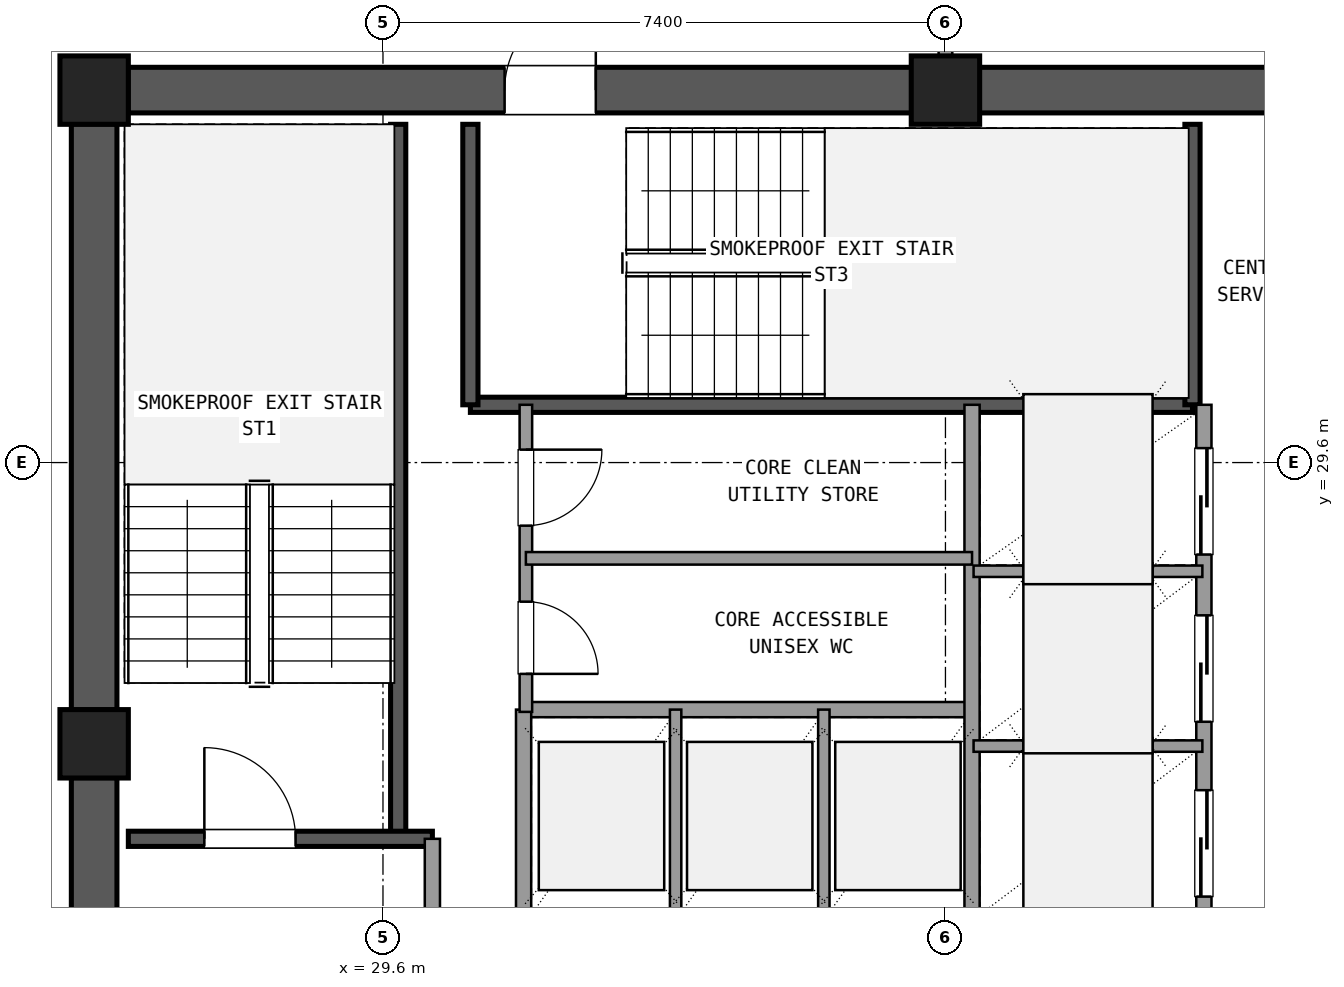
"""IFC4 building model, lengths in metres.
Left out: names, types, materials, properties, quantities, classifications, styles, units other than length and angle.
Written with IfcOpenShell. Run it as: python <this file> out.ifc"""

import sys

from ifc_helpers import new_model, si_unit, direction, frame, frame_2d, origin, origin_2d, place, context, subcontext, project, spatial, rectangle, extrude, element, fill, save


model = new_model("IFC4")
c1 = context("Model", 3, precision=1e-05, world=origin(), true_north=direction((0.0, 1.0)))
c2 = subcontext(c1, "Body", "Model", "MODEL_VIEW")
j1 = project(units=[si_unit("LENGTHUNIT", "METRE"), si_unit("PLANEANGLEUNIT", "RADIAN")], contexts=[c1])
p1 = place(None, origin())
s1 = spatial("IfcSite", under=j1, at=p1, CompositionType="ELEMENT")
p2 = place(p1, origin())
s2 = spatial("IfcBuilding", under=s1, at=p2, CompositionType="ELEMENT")
p3 = place(p2, frame((0.0, 0.0, 199.98)))
s3 = spatial("IfcBuildingStorey", under=s2, at=p3, CompositionType="ELEMENT", Elevation=199.98)
for number, where, z_axis, x_axis in (
    (1, (37.0, 34.5, 0.0), (0.0, 0.0, 1.0), (1.0, 0.0, 0.0)),
    (2, (25.8, 34.5, 0.0), (0.0, 0.0, 1.0), (1.0, 0.0, 0.0)),
    (3, (25.8, 25.9, 0.0), (0.0, 0.0, 1.0), (1.0, 0.0, 0.0)),
):
    element("IfcColumn", number, at=place(p3, frame(where, z_axis=z_axis, x_axis=x_axis)), inside=s3, PredefinedType="COLUMN", context=c2, shape_type="SweptSolid", body=[
        extrude(rectangle(XDim=0.9, YDim=0.9, at=origin_2d()), origin(), (0.0, 0.0, 1.0), 3.6),
    ])
p4 = place(p3, frame((47.755, 34.5, 0.0), z_axis=(0.0, 0.0, 1.0), x_axis=(-1.0, 0.0, 0.0)))
e4 = element("IfcWall", 4, at=p4, inside=s3, PredefinedType="SHEAR", context=c2, shape_type="SweptSolid", body=[
    extrude(rectangle(XDim=10.31, YDim=0.6, at=frame_2d((5.155, 0.0))), origin(), (0.0, 0.0, 1.0), 3.32),
])
p5 = place(p4, frame((4.655, 0.0, 0.0)))
e5 = element("IfcOpeningElement", 5, at=p5, cuts=e4, PredefinedType="OPENING", context=c2, shape_type="SweptSolid", body=[
    extrude(rectangle(XDim=1.6, YDim=2.2, at=frame_2d((0.8, 1.1))), frame((0.0, 0.31, 0.0), z_axis=(0.0, -1.0, 0.0), x_axis=(1.0, 0.0, 0.0)), (0.0, 0.0, 1.0), 0.62),
])
p6 = place(p3, frame((36.555, 34.5, 0.0), z_axis=(0.0, 0.0, 1.0), x_axis=(-1.0, 0.0, 0.0)))
e6 = element("IfcWall", 6, at=p6, inside=s3, PredefinedType="SHEAR", context=c2, shape_type="SweptSolid", body=[
    extrude(rectangle(XDim=10.31, YDim=0.6, at=frame_2d((5.155, 0.0))), origin(), (0.0, 0.0, 1.0), 3.32),
])
p7 = place(p6, frame((4.155, 0.0, 0.0)))
e7 = element("IfcOpeningElement", 7, at=p7, cuts=e6, PredefinedType="OPENING", context=c2, shape_type="SweptSolid", body=[
    extrude(rectangle(XDim=1.2, YDim=2.15, at=frame_2d((0.6, 1.075))), frame((0.0, 0.31, 0.0), z_axis=(0.0, -1.0, 0.0), x_axis=(1.0, 0.0, 0.0)), (0.0, 0.0, 1.0), 0.62),
])
p8 = place(p3, frame((25.8, 34.055, 0.0), z_axis=(0.0, 0.0, 1.0), x_axis=(0.0, -1.0, 0.0)))
e8 = element("IfcWall", 8, at=p8, inside=s3, PredefinedType="SHEAR", context=c2, shape_type="SweptSolid", body=[
    extrude(rectangle(XDim=7.71, YDim=0.6, at=frame_2d((3.855, 0.0))), origin(), (0.0, 0.0, 1.0), 3.32),
])
p9 = place(p3, frame((25.8, 25.455, 0.0), z_axis=(0.0, 0.0, 1.0), x_axis=(0.0, -1.0, 0.0)))
e9 = element("IfcWall", 9, at=p9, inside=s3, PredefinedType="SHEAR", context=c2, shape_type="SweptSolid", body=[
    extrude(rectangle(XDim=7.71, YDim=0.6, at=frame_2d((3.855, 0.0))), origin(), (0.0, 0.0, 1.0), 3.32),
])
p10 = place(p9, frame((2.205, 0.0, 0.0)))
e10 = element("IfcOpeningElement", 10, at=p10, cuts=e9, PredefinedType="OPENING", context=c2, shape_type="SweptSolid", body=[
    extrude(rectangle(XDim=1.2, YDim=2.15, at=frame_2d((0.6, 1.075))), frame((0.0, 0.31, 0.0), z_axis=(0.0, -1.0, 0.0), x_axis=(1.0, 0.0, 0.0)), (0.0, 0.0, 1.0), 0.62),
])
p11 = place(p3, frame((29.8, 24.65, 0.0), z_axis=(0.0, 0.0, 1.0), x_axis=(0.0, 1.0, 0.0)))
e11 = element("IfcWall", 11, at=p11, inside=s3, PredefinedType="SHEAR", context=c2, shape_type="SweptSolid", body=[
    extrude(rectangle(XDim=9.4, YDim=0.2, at=frame_2d((4.7, 0.0))), origin(), (0.0, 0.0, 1.0), 3.32),
])
p12 = place(p3, frame((26.25, 24.65, 0.0), z_axis=(0.0, 0.0, 1.0), x_axis=(1.0, 0.0, 0.0)))
e12 = element("IfcWall", 12, at=p12, inside=s3, PredefinedType="SHEAR", context=c2, shape_type="SweptSolid", body=[
    extrude(rectangle(XDim=4.0, YDim=0.2, at=frame_2d((2.0, 0.0))), origin(), (0.0, 0.0, 1.0), 3.32),
])
p13 = place(p12, frame((1.0, 0.0, 0.0)))
e13 = element("IfcOpeningElement", 13, at=p13, cuts=e12, PredefinedType="OPENING", context=c2, shape_type="SweptSolid", body=[
    extrude(rectangle(XDim=1.2, YDim=2.15, at=frame_2d((0.6, 1.075))), frame((0.0, 0.11, 0.0), z_axis=(0.0, -1.0, 0.0), x_axis=(1.0, 0.0, 0.0)), (0.0, 0.0, 1.0), 0.22),
])
p14 = place(p3, frame((30.75, 30.36, 0.0), z_axis=(0.0, 0.0, 1.0), x_axis=(1.0, 0.0, 0.0)))
e14 = element("IfcWall", 14, at=p14, inside=s3, PredefinedType="SHEAR", context=c2, shape_type="SweptSolid", body=[
    extrude(rectangle(XDim=9.5, YDim=0.2, at=frame_2d((4.75, 0.0))), origin(), (0.0, 0.0, 1.0), 3.32),
])
for number, where, z_axis, x_axis in (
    (15, (30.75, 30.36, 0.0), (0.0, 0.0, 1.0), (0.0, 1.0, 0.0)),
    (16, (40.25, 30.36, 0.0), (0.0, 0.0, 1.0), (0.0, 1.0, 0.0)),
):
    element("IfcWall", number, at=place(p3, frame(where, z_axis=z_axis, x_axis=x_axis)), inside=s3, PredefinedType="SHEAR", context=c2, shape_type="SweptSolid", body=[
        extrude(rectangle(XDim=3.69, YDim=0.2, at=frame_2d((1.845, 0.0))), origin(), (0.0, 0.0, 1.0), 3.32),
    ])
p15 = place(p3, frame((30.25, 17.75, 0.0), z_axis=(0.0, 0.0, 1.0), x_axis=(0.0, 1.0, 0.0)))
e17 = element("IfcWall", 17, at=p15, inside=s3, PredefinedType="SOLIDWALL", context=c2, shape_type="SweptSolid", body=[
    extrude(rectangle(XDim=6.9, YDim=0.2, at=frame_2d((3.45, 0.0))), origin(), (0.0, 0.0, 1.0), 2.61),
])
p16 = place(p15, frame((4.15, 0.0, 0.0)))
e18 = element("IfcOpeningElement", 18, at=p16, cuts=e17, PredefinedType="OPENING", context=c2, shape_type="SweptSolid", body=[
    extrude(rectangle(XDim=1.2, YDim=2.15, at=frame_2d((0.6, 1.075))), frame((0.0, 0.11, 0.0), z_axis=(0.0, -1.0, 0.0), x_axis=(1.0, 0.0, 0.0)), (0.0, 0.0, 1.0), 0.22),
])
p17 = place(p3, frame((31.45, 26.35, 0.0), z_axis=(0.0, 0.0, 1.0), x_axis=(1.0, 0.0, 0.0)))
e19 = element("IfcWall", 19, at=p17, inside=s3, PredefinedType="SOLIDWALL", context=c2, shape_type="SweptSolid", body=[
    extrude(rectangle(XDim=5.9, YDim=0.2, at=frame_2d((2.95, 0.0))), origin(), (0.0, 0.0, 1.0), 2.61),
])
p18 = place(p3, frame((31.45, 23.54, 0.0), z_axis=(0.0, 0.0, 1.0), x_axis=(0.0, 1.0, 0.0)))
e20 = element("IfcWall", 20, at=p18, inside=s3, PredefinedType="SOLIDWALL", context=c2, shape_type="SweptSolid", body=[
    extrude(rectangle(XDim=2.81, YDim=0.2, at=frame_2d((1.405, 0.0))), origin(), (0.0, 0.0, 1.0), 2.61),
])
for number, where, z_axis, x_axis in (
    (21, (33.45, 23.54, 0.0), (0.0, 0.0, 1.0), (0.0, 1.0, 0.0)),
    (22, (35.4, 23.54, 0.0), (0.0, 0.0, 1.0), (0.0, 1.0, 0.0)),
):
    element("IfcWall", number, at=place(p3, frame(where, z_axis=z_axis, x_axis=x_axis)), inside=s3, PredefinedType="PARTITIONING", context=c2, shape_type="SweptSolid", body=[
        extrude(rectangle(XDim=2.81, YDim=0.15, at=frame_2d((1.405, 0.0))), origin(), (0.0, 0.0, 1.0), 2.61),
    ])
p19 = place(p3, frame((37.35, 23.54, 0.0), z_axis=(0.0, 0.0, 1.0), x_axis=(0.0, 1.0, 0.0)))
e23 = element("IfcWall", 23, at=p19, inside=s3, PredefinedType="SOLIDWALL", context=c2, shape_type="SweptSolid", body=[
    extrude(rectangle(XDim=6.82, YDim=0.2, at=frame_2d((3.41, 0.0))), origin(), (0.0, 0.0, 1.0), 2.61),
])
p20 = place(p3, frame((40.4, 23.54, 0.0), z_axis=(0.0, 0.0, 1.0), x_axis=(0.0, 1.0, 0.0)))
e24 = element("IfcWall", 24, at=p20, inside=s3, PredefinedType="SOLIDWALL", context=c2, shape_type="SweptSolid", body=[
    extrude(rectangle(XDim=6.82, YDim=0.2, at=frame_2d((3.41, 0.0))), origin(), (0.0, 0.0, 1.0), 2.61),
])
p21 = place(p20, frame((0.35, 0.0, 0.0)))
e25 = element("IfcOpeningElement", 25, at=p21, cuts=e24, PredefinedType="OPENING", context=c2, shape_type="SweptSolid", body=[
    extrude(rectangle(XDim=1.4, YDim=2.2, at=frame_2d((0.7, 1.1))), frame((0.0, 0.11, 0.0), z_axis=(0.0, -1.0, 0.0), x_axis=(1.0, 0.0, 0.0)), (0.0, 0.0, 1.0), 0.22),
])
p22 = place(p20, frame((2.65, 0.0, 0.0)))
e26 = element("IfcOpeningElement", 26, at=p22, cuts=e24, PredefinedType="OPENING", context=c2, shape_type="SweptSolid", body=[
    extrude(rectangle(XDim=1.4, YDim=2.2, at=frame_2d((0.7, 1.1))), frame((0.0, 0.11, 0.0), z_axis=(0.0, -1.0, 0.0), x_axis=(1.0, 0.0, 0.0)), (0.0, 0.0, 1.0), 0.22),
])
p23 = place(p20, frame((4.85, 0.0, 0.0)))
e27 = element("IfcOpeningElement", 27, at=p23, cuts=e24, PredefinedType="OPENING", context=c2, shape_type="SweptSolid", body=[
    extrude(rectangle(XDim=1.4, YDim=2.2, at=frame_2d((0.7, 1.1))), frame((0.0, 0.11, 0.0), z_axis=(0.0, -1.0, 0.0), x_axis=(1.0, 0.0, 0.0)), (0.0, 0.0, 1.0), 0.22),
])
for number, where, z_axis, x_axis in (
    (28, (37.37, 25.87, 0.0), (0.0, 0.0, 1.0), (1.0, 0.0, 0.0)),
    (29, (37.37, 28.17, 0.0), (0.0, 0.0, 1.0), (1.0, 0.0, 0.0)),
):
    element("IfcWall", number, at=place(p3, frame(where, z_axis=z_axis, x_axis=x_axis)), inside=s3, PredefinedType="PARTITIONING", context=c2, shape_type="SweptSolid", body=[
        extrude(rectangle(XDim=3.01, YDim=0.15, at=frame_2d((1.505, 0.0))), origin(), (0.0, 0.0, 1.0), 2.61),
    ])
p24 = place(p3, frame((31.48, 26.32, 0.0), z_axis=(0.0, 0.0, 1.0), x_axis=(0.0, 1.0, 0.0)))
e30 = element("IfcWall", 30, at=p24, inside=s3, PredefinedType="PLUMBINGWALL", context=c2, shape_type="SweptSolid", body=[
    extrude(rectangle(XDim=4.04, YDim=0.165, at=frame_2d((2.02, 0.0))), origin(), (0.0, 0.0, 1.0), 2.61),
])
p25 = place(p24, frame((0.5, 0.0, 0.0)))
e31 = element("IfcOpeningElement", 31, at=p25, cuts=e30, PredefinedType="OPENING", context=c2, shape_type="SweptSolid", body=[
    extrude(rectangle(XDim=0.95, YDim=2.1, at=frame_2d((0.475, 1.05))), frame((0.0, 0.093, 0.0), z_axis=(0.0, -1.0, 0.0), x_axis=(1.0, 0.0, 0.0)), (0.0, 0.0, 1.0), 0.185),
])
p26 = place(p24, frame((2.45, 0.0, 0.0)))
e32 = element("IfcOpeningElement", 32, at=p26, cuts=e30, PredefinedType="OPENING", context=c2, shape_type="SweptSolid", body=[
    extrude(rectangle(XDim=1.0, YDim=2.15, at=frame_2d((0.5, 1.075))), frame((0.0, 0.093, 0.0), z_axis=(0.0, -1.0, 0.0), x_axis=(1.0, 0.0, 0.0)), (0.0, 0.0, 1.0), 0.185),
])
p27 = place(p3, frame((31.48, 28.34, 0.0), z_axis=(0.0, 0.0, 1.0), x_axis=(1.0, 0.0, 0.0)))
e33 = element("IfcWall", 33, at=p27, inside=s3, PredefinedType="PLUMBINGWALL", context=c2, shape_type="SweptSolid", body=[
    extrude(rectangle(XDim=5.87, YDim=0.165, at=frame_2d((2.935, 0.0))), origin(), (0.0, 0.0, 1.0), 2.61),
])
p28 = place(p3, frame((37.0, 34.95, 0.0), z_axis=(0.0, 0.0, 1.0), x_axis=(0.0, 1.0, 0.0)))
e34 = element("IfcWall", 34, at=p28, inside=s3, PredefinedType="PARTITIONING", context=c2, shape_type="SweptSolid", body=[
    extrude(rectangle(XDim=2.7, YDim=0.18, at=frame_2d((1.35, 0.0))), origin(), (0.0, 0.0, 1.0), 2.61),
])
p29 = place(p28, frame((0.35, 0.0, 0.0)))
e35 = element("IfcOpeningElement", 35, at=p29, cuts=e34, PredefinedType="OPENING", context=c2, shape_type="SweptSolid", body=[
    extrude(rectangle(XDim=2.0, YDim=2.2, at=frame_2d((1.0, 1.1))), frame((0.0, 0.1, 0.0), z_axis=(0.0, -1.0, 0.0), x_axis=(1.0, 0.0, 0.0)), (0.0, 0.0, 1.0), 0.2),
])
p30 = place(p13, origin())
e36 = element("IfcDoor", 36, at=p30, inside=s3, OperationType="SINGLE_SWING_LEFT", PredefinedType="DOOR", context=c2, shape_type="SweptSolid", body=[
    extrude(rectangle(XDim=1.2, YDim=2.15, at=frame_2d((0.6, 1.075))), frame((0.0, 0.025, 0.0), z_axis=(0.0, -1.0, 0.0), x_axis=(1.0, 0.0, 0.0)), (0.0, 0.0, 1.0), 0.05),
])
fill(e13, e36)
p31 = place(p7, frame((1.2, 0.0, 0.0), z_axis=(0.0, 0.0, 1.0), x_axis=(-1.0, 0.0, 0.0)))
e37 = element("IfcDoor", 37, at=p31, inside=s3, OperationType="SINGLE_SWING_LEFT", PredefinedType="DOOR", context=c2, shape_type="SweptSolid", body=[
    extrude(rectangle(XDim=1.2, YDim=2.15, at=frame_2d((0.6, 1.075))), frame((0.0, 0.025, 0.0), z_axis=(0.0, -1.0, 0.0), x_axis=(1.0, 0.0, 0.0)), (0.0, 0.0, 1.0), 0.05),
])
fill(e7, e37)
p32 = place(p21, origin())
e38 = element("IfcDoor", 38, at=p32, inside=s3, OperationType="SLIDING_TO_LEFT", PredefinedType="DOOR", context=c2, shape_type="SweptSolid", body=[
    extrude(rectangle(XDim=1.4, YDim=2.2, at=frame_2d((0.7, 1.1))), frame((0.0, 0.025, 0.0), z_axis=(0.0, -1.0, 0.0), x_axis=(1.0, 0.0, 0.0)), (0.0, 0.0, 1.0), 0.05),
])
fill(e25, e38)
p33 = place(p22, origin())
e39 = element("IfcDoor", 39, at=p33, inside=s3, OperationType="SLIDING_TO_LEFT", PredefinedType="DOOR", context=c2, shape_type="SweptSolid", body=[
    extrude(rectangle(XDim=1.4, YDim=2.2, at=frame_2d((0.7, 1.1))), frame((0.0, 0.025, 0.0), z_axis=(0.0, -1.0, 0.0), x_axis=(1.0, 0.0, 0.0)), (0.0, 0.0, 1.0), 0.05),
])
fill(e26, e39)
p34 = place(p23, origin())
e40 = element("IfcDoor", 40, at=p34, inside=s3, OperationType="SLIDING_TO_RIGHT", PredefinedType="DOOR", context=c2, shape_type="SweptSolid", body=[
    extrude(rectangle(XDim=1.4, YDim=2.2, at=frame_2d((0.7, 1.1))), frame((0.0, 0.025, 0.0), z_axis=(0.0, -1.0, 0.0), x_axis=(1.0, 0.0, 0.0)), (0.0, 0.0, 1.0), 0.05),
])
fill(e27, e40)
p35 = place(p25, frame((0.95, 0.0, 0.0), z_axis=(0.0, 0.0, 1.0), x_axis=(-1.0, 0.0, 0.0)))
e41 = element("IfcDoor", 41, at=p35, inside=s3, OperationType="SINGLE_SWING_LEFT", PredefinedType="DOOR", context=c2, shape_type="SweptSolid", body=[
    extrude(rectangle(XDim=0.95, YDim=2.1, at=frame_2d((0.475, 1.05))), frame((0.0, 0.025, 0.0), z_axis=(0.0, -1.0, 0.0), x_axis=(1.0, 0.0, 0.0)), (0.0, 0.0, 1.0), 0.05),
])
fill(e31, e41)
p36 = place(p26, frame((1.0, 0.0, 0.0), z_axis=(0.0, 0.0, 1.0), x_axis=(-1.0, 0.0, 0.0)))
e42 = element("IfcDoor", 42, at=p36, inside=s3, OperationType="SINGLE_SWING_RIGHT", PredefinedType="DOOR", context=c2, shape_type="SweptSolid", body=[
    extrude(rectangle(XDim=1.0, YDim=2.15, at=frame_2d((0.5, 1.075))), frame((0.0, 0.025, 0.0), z_axis=(0.0, -1.0, 0.0), x_axis=(1.0, 0.0, 0.0)), (0.0, 0.0, 1.0), 0.05),
])
fill(e32, e42)
save(model, sys.argv[1])
